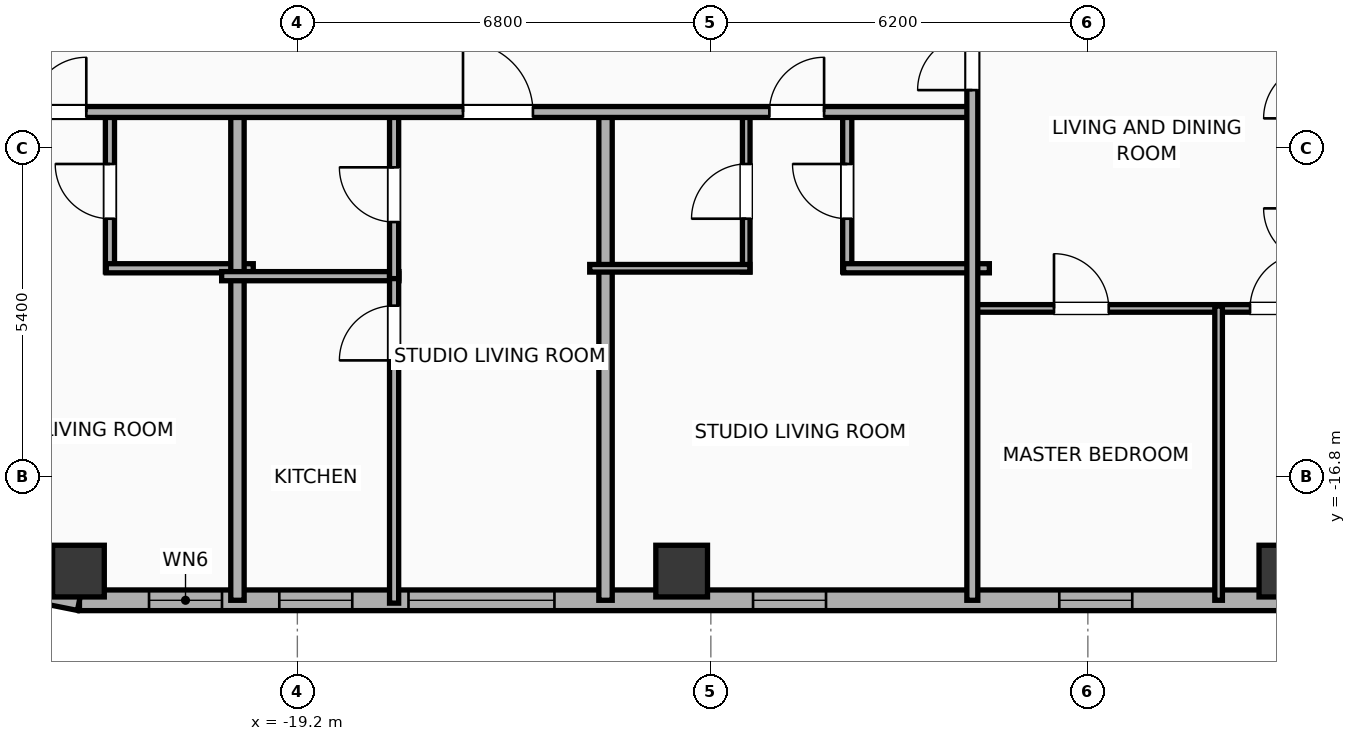
"""IFC4 building model, lengths in metres.
Left out: names, types, materials, properties, quantities, classifications, styles, units other than length and angle.
Written with IfcOpenShell. Run it as: python <this file> out.ifc"""

import sys

from ifc_helpers import new_model, si_unit, direction, frame, frame_2d, origin, origin_2d, place, context, subcontext, project, spatial, rectangle, hollow_rectangle, extrude, element, fill, save


model = new_model("IFC4")
c1 = context("Model", 3, precision=1e-05, world=origin(), true_north=direction((0.0, 1.0)))
c2 = subcontext(c1, "Body", "Model", "MODEL_VIEW")
j1 = project(units=[si_unit("LENGTHUNIT", "METRE"), si_unit("PLANEANGLEUNIT", "RADIAN")], contexts=[c1])
p1 = place(None, origin())
s1 = spatial("IfcSite", under=j1, at=p1, CompositionType="ELEMENT")
p2 = place(p1, origin())
s2 = spatial("IfcBuilding", under=s1, at=p2, CompositionType="ELEMENT")
p3 = place(p2, frame((0.0, 0.0, 215.8)))
s3 = spatial("IfcBuildingStorey", under=s2, at=p3, CompositionType="ELEMENT", Elevation=215.8)
for number, where, z_axis, x_axis in (
    (1, (-22.8, -18.35, 0.0), (0.0, 0.0, 1.0), (1.0, 0.0, 0.0)),
    (2, (-12.88, -18.35, 0.0), (0.0, 0.0, 1.0), (1.0, 0.0, 0.0)),
    (3, (-2.96, -18.35, 0.0), (0.0, 0.0, 1.0), (1.0, 0.0, 0.0)),
):
    element("IfcColumn", number, at=place(p3, frame(where, z_axis=z_axis, x_axis=x_axis)), inside=s3, PredefinedType="COLUMN", context=c2, shape_type="SweptSolid", body=[
        extrude(hollow_rectangle(XDim=0.85, YDim=0.85, WallThickness=0.028, at=origin_2d()), origin(), (0.0, 0.0, 1.0), 3.9),
    ])
p4 = place(p3, frame((26.783, -18.83, 0.0), z_axis=(0.0, 0.0, 1.0), x_axis=(-1.0, 0.0, 0.0)))
e4 = element("IfcWall", 4, at=p4, inside=s3, PredefinedType="ELEMENTEDWALL", context=c2, shape_type="SweptSolid", body=[
    extrude(rectangle(XDim=49.566, YDim=0.34, at=frame_2d((24.783, 0.0))), origin(), (0.0, 0.0, 1.0), 3.65),
])
p5 = place(p4, frame((23.583, 0.0, 0.75)))
e5 = element("IfcOpeningElement", 5, at=p5, cuts=e4, PredefinedType="OPENING", context=c2, shape_type="SweptSolid", body=[
    extrude(rectangle(XDim=2.4, YDim=2.1, at=frame_2d((1.2, 1.05))), frame((0.0, 0.18, 0.0), z_axis=(0.0, -1.0, 0.0), x_axis=(1.0, 0.0, 0.0)), (0.0, 0.0, 1.0), 0.36),
])
p6 = place(p4, frame((41.756, 0.0, 0.75)))
e6 = element("IfcOpeningElement", 6, at=p6, cuts=e4, PredefinedType="OPENING", context=c2, shape_type="SweptSolid", body=[
    extrude(rectangle(XDim=2.4, YDim=2.1, at=frame_2d((1.2, 1.05))), frame((0.0, 0.18, 0.0), z_axis=(0.0, -1.0, 0.0), x_axis=(1.0, 0.0, 0.0)), (0.0, 0.0, 1.0), 0.36),
])
p7 = place(p4, frame((47.222, 0.0, 0.75)))
e7 = element("IfcOpeningElement", 7, at=p7, cuts=e4, PredefinedType="OPENING", context=c2, shape_type="SweptSolid", body=[
    extrude(rectangle(XDim=1.2, YDim=2.05, at=frame_2d((0.6, 1.025))), frame((0.0, 0.18, 0.0), z_axis=(0.0, -1.0, 0.0), x_axis=(1.0, 0.0, 0.0)), (0.0, 0.0, 1.0), 0.36),
])
p8 = place(p4, frame((45.08, 0.0, 0.75)))
e8 = element("IfcOpeningElement", 8, at=p8, cuts=e4, PredefinedType="OPENING", context=c2, shape_type="SweptSolid", body=[
    extrude(rectangle(XDim=1.2, YDim=2.05, at=frame_2d((0.6, 1.025))), frame((0.0, 0.18, 0.0), z_axis=(0.0, -1.0, 0.0), x_axis=(1.0, 0.0, 0.0)), (0.0, 0.0, 1.0), 0.36),
])
p9 = place(p4, frame((37.289, 0.0, 0.75)))
e9 = element("IfcOpeningElement", 9, at=p9, cuts=e4, PredefinedType="OPENING", context=c2, shape_type="SweptSolid", body=[
    extrude(rectangle(XDim=1.2, YDim=2.05, at=frame_2d((0.6, 1.025))), frame((0.0, 0.18, 0.0), z_axis=(0.0, -1.0, 0.0), x_axis=(1.0, 0.0, 0.0)), (0.0, 0.0, 1.0), 0.36),
])
p10 = place(p4, frame((16.115, 0.0, 0.75)))
e10 = element("IfcOpeningElement", 10, at=p10, cuts=e4, PredefinedType="OPENING", context=c2, shape_type="SweptSolid", body=[
    extrude(rectangle(XDim=1.2, YDim=2.05, at=frame_2d((0.6, 1.025))), frame((0.0, 0.18, 0.0), z_axis=(0.0, -1.0, 0.0), x_axis=(1.0, 0.0, 0.0)), (0.0, 0.0, 1.0), 0.36),
])
p11 = place(p4, frame((12.422, 0.0, 0.75)))
e11 = element("IfcOpeningElement", 11, at=p11, cuts=e4, PredefinedType="OPENING", context=c2, shape_type="SweptSolid", body=[
    extrude(rectangle(XDim=1.2, YDim=2.05, at=frame_2d((0.6, 1.025))), frame((0.0, 0.18, 0.0), z_axis=(0.0, -1.0, 0.0), x_axis=(1.0, 0.0, 0.0)), (0.0, 0.0, 1.0), 0.36),
])
p12 = place(p4, frame((8.09, 0.0, 0.75)))
e12 = element("IfcOpeningElement", 12, at=p12, cuts=e4, PredefinedType="OPENING", context=c2, shape_type="SweptSolid", body=[
    extrude(rectangle(XDim=1.2, YDim=2.05, at=frame_2d((0.6, 1.025))), frame((0.0, 0.18, 0.0), z_axis=(0.0, -1.0, 0.0), x_axis=(1.0, 0.0, 0.0)), (0.0, 0.0, 1.0), 0.36),
])
p13 = place(p4, frame((4.637, 0.0, 0.75)))
e13 = element("IfcOpeningElement", 13, at=p13, cuts=e4, PredefinedType="OPENING", context=c2, shape_type="SweptSolid", body=[
    extrude(rectangle(XDim=1.2, YDim=2.05, at=frame_2d((0.6, 1.025))), frame((0.0, 0.18, 0.0), z_axis=(0.0, -1.0, 0.0), x_axis=(1.0, 0.0, 0.0)), (0.0, 0.0, 1.0), 0.36),
])
p14 = place(p4, frame((1.811, 0.0, 0.75)))
e14 = element("IfcOpeningElement", 14, at=p14, cuts=e4, PredefinedType="OPENING", context=c2, shape_type="SweptSolid", body=[
    extrude(rectangle(XDim=1.2, YDim=2.05, at=frame_2d((0.6, 1.025))), frame((0.0, 0.18, 0.0), z_axis=(0.0, -1.0, 0.0), x_axis=(1.0, 0.0, 0.0)), (0.0, 0.0, 1.0), 0.36),
])
p15 = place(p4, frame((32.253, 0.0, 0.75)))
e15 = element("IfcOpeningElement", 15, at=p15, cuts=e4, PredefinedType="OPENING", context=c2, shape_type="SweptSolid", body=[
    extrude(rectangle(XDim=1.2, YDim=2.05, at=frame_2d((0.6, 1.025))), frame((0.0, 0.18, 0.0), z_axis=(0.0, -1.0, 0.0), x_axis=(1.0, 0.0, 0.0)), (0.0, 0.0, 1.0), 0.36),
])
p16 = place(p4, frame((27.853, 0.0, 0.75)))
e16 = element("IfcOpeningElement", 16, at=p16, cuts=e4, PredefinedType="OPENING", context=c2, shape_type="SweptSolid", body=[
    extrude(rectangle(XDim=1.2, YDim=2.05, at=frame_2d((0.6, 1.025))), frame((0.0, 0.18, 0.0), z_axis=(0.0, -1.0, 0.0), x_axis=(1.0, 0.0, 0.0)), (0.0, 0.0, 1.0), 0.36),
])
p17 = place(p4, frame((20.473, 0.0, 0.75)))
e17 = element("IfcOpeningElement", 17, at=p17, cuts=e4, PredefinedType="OPENING", context=c2, shape_type="SweptSolid", body=[
    extrude(rectangle(XDim=1.2, YDim=2.05, at=frame_2d((0.6, 1.025))), frame((0.0, 0.18, 0.0), z_axis=(0.0, -1.0, 0.0), x_axis=(1.0, 0.0, 0.0)), (0.0, 0.0, 1.0), 0.36),
])
p18 = place(p3, frame((-22.783, -18.83, 0.0), z_axis=(0.0, 0.0, 1.0), x_axis=(-0.980788153188, 0.195075878998, 0.0)))
e18 = element("IfcWall", 18, at=p18, inside=s3, PredefinedType="ELEMENTEDWALL", context=c2, shape_type="SweptSolid", body=[
    extrude(rectangle(XDim=1.354, YDim=0.34, at=frame_2d((0.677, 0.0))), origin(), (0.0, 0.0, 1.0), 3.65),
])
p19 = place(p3, frame((-22.282, -13.43, 0.0), z_axis=(0.0, 0.0, 1.0), x_axis=(0.0, 1.0, 0.0)))
e19 = element("IfcWall", 19, at=p19, inside=s3, PredefinedType="PLUMBINGWALL", context=c2, shape_type="SweptSolid", body=[
    extrude(rectangle(XDim=2.65, YDim=0.15, at=frame_2d((1.325, 0.0))), origin(), (0.0, 0.0, 1.0), 3.65),
])
p20 = place(p19, frame((0.875, 0.0, 0.0)))
e20 = element("IfcOpeningElement", 20, at=p20, cuts=e19, PredefinedType="OPENING", context=c2, shape_type="SweptSolid", body=[
    extrude(rectangle(XDim=0.9, YDim=2.05, at=frame_2d((0.45, 1.025))), frame((0.0, 0.085, 0.0), z_axis=(0.0, -1.0, 0.0), x_axis=(1.0, 0.0, 0.0)), (0.0, 0.0, 1.0), 0.17),
])
p21 = place(p3, frame((-22.342, -13.37, 0.0), z_axis=(0.0, 0.0, 1.0), x_axis=(1.0, 0.0, 0.0)))
e21 = element("IfcWall", 21, at=p21, inside=s3, PredefinedType="PLUMBINGWALL", context=c2, shape_type="SweptSolid", body=[
    extrude(rectangle(XDim=2.417, YDim=0.15, at=frame_2d((1.208, 0.0))), origin(), (0.0, 0.0, 1.0), 3.65),
])
p22 = place(p3, frame((-20.185, -18.83, 0.0), z_axis=(0.0, 0.0, 1.0), x_axis=(0.0, 1.0, 0.0)))
e22 = element("IfcWall", 22, at=p22, inside=s3, PredefinedType="PARTITIONING", context=c2, shape_type="SweptSolid", body=[
    extrude(rectangle(XDim=8.11, YDim=0.22, at=frame_2d((4.055, 0.0))), origin(), (0.0, 0.0, 1.0), 3.09),
])
p23 = place(p3, frame((-20.445, -13.5, 0.0), z_axis=(0.0, 0.0, 1.0), x_axis=(1.0, 0.0, 0.0)))
e23 = element("IfcWall", 23, at=p23, inside=s3, PredefinedType="PLUMBINGWALL", context=c2, shape_type="SweptSolid", body=[
    extrude(rectangle(XDim=2.916, YDim=0.15, at=frame_2d((1.458, 0.0))), origin(), (0.0, 0.0, 1.0), 3.65),
])
p24 = place(p3, frame((-17.609, -18.877, 0.0), z_axis=(0.0, 0.0, 1.0), x_axis=(0.0, 1.0, 0.0)))
e24 = element("IfcWall", 24, at=p24, inside=s3, PredefinedType="PLUMBINGWALL", context=c2, shape_type="SweptSolid", body=[
    extrude(rectangle(XDim=5.417, YDim=0.15, at=frame_2d((2.708, 0.0))), origin(), (0.0, 0.0, 1.0), 3.65),
])
p25 = place(p24, frame((3.992, 0.0, 0.0)))
e25 = element("IfcOpeningElement", 25, at=p25, cuts=e24, PredefinedType="OPENING", context=c2, shape_type="SweptSolid", body=[
    extrude(rectangle(XDim=0.9, YDim=2.05, at=frame_2d((0.45, 1.025))), frame((0.0, 0.085, 0.0), z_axis=(0.0, -1.0, 0.0), x_axis=(1.0, 0.0, 0.0)), (0.0, 0.0, 1.0), 0.17),
])
p26 = place(p3, frame((-17.609, -13.54, 0.0), z_axis=(0.0, 0.0, 1.0), x_axis=(0.0, 1.0, 0.0)))
e26 = element("IfcWall", 26, at=p26, inside=s3, PredefinedType="PLUMBINGWALL", context=c2, shape_type="SweptSolid", body=[
    extrude(rectangle(XDim=2.76, YDim=0.15, at=frame_2d((1.38, 0.0))), origin(), (0.0, 0.0, 1.0), 3.65),
])
p27 = place(p26, frame((0.93, 0.0, 0.0)))
e27 = element("IfcOpeningElement", 27, at=p27, cuts=e26, PredefinedType="OPENING", context=c2, shape_type="SweptSolid", body=[
    extrude(rectangle(XDim=0.9, YDim=2.05, at=frame_2d((0.45, 1.025))), frame((0.0, 0.085, 0.0), z_axis=(0.0, -1.0, 0.0), x_axis=(1.0, 0.0, 0.0)), (0.0, 0.0, 1.0), 0.17),
])
p28 = place(p3, frame((-14.132, -18.83, 0.0), z_axis=(0.0, 0.0, 1.0), x_axis=(0.0, 1.0, 0.0)))
e28 = element("IfcWall", 28, at=p28, inside=s3, PredefinedType="PARTITIONING", context=c2, shape_type="SweptSolid", body=[
    extrude(rectangle(XDim=8.11, YDim=0.22, at=frame_2d((4.055, 0.0))), origin(), (0.0, 0.0, 1.0), 3.65),
])
p29 = place(p3, frame((-11.818, -13.43, 0.0), z_axis=(0.0, 0.0, 1.0), x_axis=(0.0, 1.0, 0.0)))
e29 = element("IfcWall", 29, at=p29, inside=s3, PredefinedType="PARTITIONING", context=c2, shape_type="SweptSolid", body=[
    extrude(rectangle(XDim=2.65, YDim=0.125, at=frame_2d((1.325, 0.0))), origin(), (0.0, 0.0, 1.0), 3.65),
])
p30 = place(p29, frame((0.875, 0.0, 0.0)))
e30 = element("IfcOpeningElement", 30, at=p30, cuts=e29, PredefinedType="OPENING", context=c2, shape_type="SweptSolid", body=[
    extrude(rectangle(XDim=0.9, YDim=2.05, at=frame_2d((0.45, 1.025))), frame((0.0, 0.073, 0.0), z_axis=(0.0, -1.0, 0.0), x_axis=(1.0, 0.0, 0.0)), (0.0, 0.0, 1.0), 0.145),
])
p31 = place(p3, frame((-10.157, -13.43, 0.0), z_axis=(0.0, 0.0, 1.0), x_axis=(0.0, 1.0, 0.0)))
e31 = element("IfcWall", 31, at=p31, inside=s3, PredefinedType="PLUMBINGWALL", context=c2, shape_type="SweptSolid", body=[
    extrude(rectangle(XDim=2.65, YDim=0.15, at=frame_2d((1.325, 0.0))), origin(), (0.0, 0.0, 1.0), 3.65),
])
p32 = place(p31, frame((0.875, 0.0, 0.0)))
e32 = element("IfcOpeningElement", 32, at=p32, cuts=e31, PredefinedType="OPENING", context=c2, shape_type="SweptSolid", body=[
    extrude(rectangle(XDim=0.9, YDim=2.05, at=frame_2d((0.45, 1.025))), frame((0.0, 0.085, 0.0), z_axis=(0.0, -1.0, 0.0), x_axis=(1.0, 0.0, 0.0)), (0.0, 0.0, 1.0), 0.17),
])
p33 = place(p3, frame((-14.392, -13.37, 0.0), z_axis=(0.0, 0.0, 1.0), x_axis=(1.0, 0.0, 0.0)))
e33 = element("IfcWall", 33, at=p33, inside=s3, PredefinedType="PARTITIONING", context=c2, shape_type="SweptSolid", body=[
    extrude(rectangle(XDim=2.634, YDim=0.125, at=frame_2d((1.317, 0.0))), origin(), (0.0, 0.0, 1.0), 3.65),
])
p34 = place(p3, frame((-10.217, -13.37, 0.0), z_axis=(0.0, 0.0, 1.0), x_axis=(1.0, 0.0, 0.0)))
e34 = element("IfcWall", 34, at=p34, inside=s3, PredefinedType="PLUMBINGWALL", context=c2, shape_type="SweptSolid", body=[
    extrude(rectangle(XDim=2.397, YDim=0.15, at=frame_2d((1.198, 0.0))), origin(), (0.0, 0.0, 1.0), 3.65),
])
p35 = place(p3, frame((-26.23, -10.8, 0.0), z_axis=(0.0, 0.0, 1.0), x_axis=(1.0, 0.0, 0.0)))
e35 = element("IfcWall", 35, at=p35, inside=s3, PredefinedType="PARTITIONING", context=c2, shape_type="SweptSolid", body=[
    extrude(rectangle(XDim=18.15, YDim=0.18, at=frame_2d((9.075, 0.0))), origin(), (0.0, 0.0, 1.0), 3.65),
])
p36 = place(p35, frame((2.659, 0.0, 0.0)))
e36 = element("IfcOpeningElement", 36, at=p36, cuts=e35, PredefinedType="OPENING", context=c2, shape_type="SweptSolid", body=[
    extrude(rectangle(XDim=0.9, YDim=2.05, at=frame_2d((0.45, 1.025))), frame((0.0, 0.1, 0.0), z_axis=(0.0, -1.0, 0.0), x_axis=(1.0, 0.0, 0.0)), (0.0, 0.0, 1.0), 0.2),
])
p37 = place(p35, frame((9.754, 0.0, 0.0)))
e37 = element("IfcOpeningElement", 37, at=p37, cuts=e35, PredefinedType="OPENING", context=c2, shape_type="SweptSolid", body=[
    extrude(rectangle(XDim=1.15, YDim=2.05, at=frame_2d((0.575, 1.025))), frame((0.0, 0.1, 0.0), z_axis=(0.0, -1.0, 0.0), x_axis=(1.0, 0.0, 0.0)), (0.0, 0.0, 1.0), 0.2),
])
p38 = place(p35, frame((14.792, 0.0, 0.0)))
e38 = element("IfcOpeningElement", 38, at=p38, cuts=e35, PredefinedType="OPENING", context=c2, shape_type="SweptSolid", body=[
    extrude(rectangle(XDim=0.9, YDim=2.05, at=frame_2d((0.45, 1.025))), frame((0.0, 0.1, 0.0), z_axis=(0.0, -1.0, 0.0), x_axis=(1.0, 0.0, 0.0)), (0.0, 0.0, 1.0), 0.2),
])
p39 = place(p3, frame((-8.08, -14.03, 0.0), z_axis=(0.0, 0.0, 1.0), x_axis=(1.0, 0.0, 0.0)))
e39 = element("IfcWall", 39, at=p39, inside=s3, PredefinedType="PARTITIONING", context=c2, shape_type="SweptSolid", body=[
    extrude(rectangle(XDim=8.06, YDim=0.125, at=frame_2d((4.03, 0.0))), origin(), (0.0, 0.0, 1.0), 3.65),
])
p40 = place(p39, frame((1.323, 0.0, 0.0)))
e40 = element("IfcOpeningElement", 40, at=p40, cuts=e39, PredefinedType="OPENING", context=c2, shape_type="SweptSolid", body=[
    extrude(rectangle(XDim=0.9, YDim=2.05, at=frame_2d((0.45, 1.025))), frame((0.0, 0.073, 0.0), z_axis=(0.0, -1.0, 0.0), x_axis=(1.0, 0.0, 0.0)), (0.0, 0.0, 1.0), 0.145),
])
p41 = place(p39, frame((4.547, 0.0, 0.0)))
e41 = element("IfcOpeningElement", 41, at=p41, cuts=e39, PredefinedType="OPENING", context=c2, shape_type="SweptSolid", body=[
    extrude(rectangle(XDim=0.9, YDim=2.05, at=frame_2d((0.45, 1.025))), frame((0.0, 0.073, 0.0), z_axis=(0.0, -1.0, 0.0), x_axis=(1.0, 0.0, 0.0)), (0.0, 0.0, 1.0), 0.145),
])
p42 = place(p3, frame((-4.05, -18.83, 0.0), z_axis=(0.0, 0.0, 1.0), x_axis=(0.0, 1.0, 0.0)))
e42 = element("IfcWall", 42, at=p42, inside=s3, PredefinedType="PARTITIONING", context=c2, shape_type="SweptSolid", body=[
    extrude(rectangle(XDim=4.84, YDim=0.125, at=frame_2d((2.42, 0.0))), origin(), (0.0, 0.0, 1.0), 3.65),
])
p43 = place(p3, frame((-8.1, -18.83, 0.0), z_axis=(0.0, 0.0, 1.0), x_axis=(0.0, 1.0, 0.0)))
e43 = element("IfcWall", 43, at=p43, inside=s3, PredefinedType="PARTITIONING", context=c2, shape_type="SweptSolid", body=[
    extrude(rectangle(XDim=9.64, YDim=0.18, at=frame_2d((4.82, 0.0))), origin(), (0.0, 0.0, 1.0), 3.65),
])
p44 = place(p43, frame((8.39, 0.0, 0.0)))
e44 = element("IfcOpeningElement", 44, at=p44, cuts=e43, PredefinedType="OPENING", context=c2, shape_type="SweptSolid", body=[
    extrude(rectangle(XDim=0.9, YDim=2.05, at=frame_2d((0.45, 1.025))), frame((0.0, 0.1, 0.0), z_axis=(0.0, -1.0, 0.0), x_axis=(1.0, 0.0, 0.0)), (0.0, 0.0, 1.0), 0.2),
])
p45 = place(p6, origin())
e45 = element("IfcWindow", 45, at=p45, inside=s3, PartitioningType="SINGLE_PANEL", PredefinedType="WINDOW", context=c2, shape_type="SweptSolid", body=[
    extrude(rectangle(XDim=2.4, YDim=2.1, at=frame_2d((1.2, 1.05))), frame((0.0, 0.03, 0.0), z_axis=(0.0, -1.0, 0.0), x_axis=(1.0, 0.0, 0.0)), (0.0, 0.0, 1.0), 0.06),
])
fill(e6, e45)
p46 = place(p7, origin())
e46 = element("IfcWindow", 46, at=p46, inside=s3, PartitioningType="SINGLE_PANEL", PredefinedType="WINDOW", context=c2, shape_type="SweptSolid", body=[
    extrude(rectangle(XDim=1.2, YDim=2.05, at=frame_2d((0.6, 1.025))), frame((0.0, 0.03, 0.0), z_axis=(0.0, -1.0, 0.0), x_axis=(1.0, 0.0, 0.0)), (0.0, 0.0, 1.0), 0.06),
])
fill(e7, e46)
p47 = place(p8, origin())
e47 = element("IfcWindow", 47, at=p47, inside=s3, PartitioningType="SINGLE_PANEL", PredefinedType="WINDOW", context=c2, shape_type="SweptSolid", body=[
    extrude(rectangle(XDim=1.2, YDim=2.05, at=frame_2d((0.6, 1.025))), frame((0.0, 0.03, 0.0), z_axis=(0.0, -1.0, 0.0), x_axis=(1.0, 0.0, 0.0)), (0.0, 0.0, 1.0), 0.06),
])
fill(e8, e47)
p48 = place(p9, origin())
e48 = element("IfcWindow", 48, at=p48, inside=s3, PartitioningType="SINGLE_PANEL", PredefinedType="WINDOW", context=c2, shape_type="SweptSolid", body=[
    extrude(rectangle(XDim=1.2, YDim=2.05, at=frame_2d((0.6, 1.025))), frame((0.0, 0.03, 0.0), z_axis=(0.0, -1.0, 0.0), x_axis=(1.0, 0.0, 0.0)), (0.0, 0.0, 1.0), 0.06),
])
fill(e9, e48)
p49 = place(p15, origin())
e49 = element("IfcWindow", 49, at=p49, inside=s3, PartitioningType="SINGLE_PANEL", PredefinedType="WINDOW", context=c2, shape_type="SweptSolid", body=[
    extrude(rectangle(XDim=1.2, YDim=2.05, at=frame_2d((0.6, 1.025))), frame((0.0, 0.03, 0.0), z_axis=(0.0, -1.0, 0.0), x_axis=(1.0, 0.0, 0.0)), (0.0, 0.0, 1.0), 0.06),
])
fill(e15, e49)
p50 = place(p20, origin())
e50 = element("IfcDoor", 50, at=p50, inside=s3, OperationType="SINGLE_SWING_RIGHT", PredefinedType="DOOR", context=c2, shape_type="SweptSolid", body=[
    extrude(rectangle(XDim=0.9, YDim=2.05, at=frame_2d((0.45, 1.025))), frame((0.0, 0.025, 0.0), z_axis=(0.0, -1.0, 0.0), x_axis=(1.0, 0.0, 0.0)), (0.0, 0.0, 1.0), 0.05),
])
fill(e20, e50)
p51 = place(p25, origin())
e51 = element("IfcDoor", 51, at=p51, inside=s3, OperationType="SINGLE_SWING_LEFT", PredefinedType="DOOR", context=c2, shape_type="SweptSolid", body=[
    extrude(rectangle(XDim=0.9, YDim=2.05, at=frame_2d((0.45, 1.025))), frame((0.0, 0.025, 0.0), z_axis=(0.0, -1.0, 0.0), x_axis=(1.0, 0.0, 0.0)), (0.0, 0.0, 1.0), 0.05),
])
fill(e25, e51)
p52 = place(p27, origin())
e52 = element("IfcDoor", 52, at=p52, inside=s3, OperationType="SINGLE_SWING_RIGHT", PredefinedType="DOOR", context=c2, shape_type="SweptSolid", body=[
    extrude(rectangle(XDim=0.9, YDim=2.05, at=frame_2d((0.45, 1.025))), frame((0.0, 0.025, 0.0), z_axis=(0.0, -1.0, 0.0), x_axis=(1.0, 0.0, 0.0)), (0.0, 0.0, 1.0), 0.05),
])
fill(e27, e52)
p53 = place(p30, origin())
e53 = element("IfcDoor", 53, at=p53, inside=s3, OperationType="SINGLE_SWING_LEFT", PredefinedType="DOOR", context=c2, shape_type="SweptSolid", body=[
    extrude(rectangle(XDim=0.9, YDim=2.05, at=frame_2d((0.45, 1.025))), frame((0.0, 0.025, 0.0), z_axis=(0.0, -1.0, 0.0), x_axis=(1.0, 0.0, 0.0)), (0.0, 0.0, 1.0), 0.05),
])
fill(e30, e53)
p54 = place(p32, origin())
e54 = element("IfcDoor", 54, at=p54, inside=s3, OperationType="SINGLE_SWING_RIGHT", PredefinedType="DOOR", context=c2, shape_type="SweptSolid", body=[
    extrude(rectangle(XDim=0.9, YDim=2.05, at=frame_2d((0.45, 1.025))), frame((0.0, 0.025, 0.0), z_axis=(0.0, -1.0, 0.0), x_axis=(1.0, 0.0, 0.0)), (0.0, 0.0, 1.0), 0.05),
])
fill(e32, e54)
p55 = place(p36, origin())
e55 = element("IfcDoor", 55, at=p55, inside=s3, OperationType="SINGLE_SWING_RIGHT", PredefinedType="DOOR", context=c2, shape_type="SweptSolid", body=[
    extrude(rectangle(XDim=0.9, YDim=2.05, at=frame_2d((0.45, 1.025))), frame((0.0, 0.025, 0.0), z_axis=(0.0, -1.0, 0.0), x_axis=(1.0, 0.0, 0.0)), (0.0, 0.0, 1.0), 0.05),
])
fill(e36, e55)
p56 = place(p37, origin())
e56 = element("IfcDoor", 56, at=p56, inside=s3, OperationType="SINGLE_SWING_LEFT", PredefinedType="DOOR", context=c2, shape_type="SweptSolid", body=[
    extrude(rectangle(XDim=1.15, YDim=2.05, at=frame_2d((0.575, 1.025))), frame((0.0, 0.025, 0.0), z_axis=(0.0, -1.0, 0.0), x_axis=(1.0, 0.0, 0.0)), (0.0, 0.0, 1.0), 0.05),
])
fill(e37, e56)
p57 = place(p38, origin())
e57 = element("IfcDoor", 57, at=p57, inside=s3, OperationType="SINGLE_SWING_RIGHT", PredefinedType="DOOR", context=c2, shape_type="SweptSolid", body=[
    extrude(rectangle(XDim=0.9, YDim=2.05, at=frame_2d((0.45, 1.025))), frame((0.0, 0.025, 0.0), z_axis=(0.0, -1.0, 0.0), x_axis=(1.0, 0.0, 0.0)), (0.0, 0.0, 1.0), 0.05),
])
fill(e38, e57)
p58 = place(p40, origin())
e58 = element("IfcDoor", 58, at=p58, inside=s3, OperationType="SINGLE_SWING_LEFT", PredefinedType="DOOR", context=c2, shape_type="SweptSolid", body=[
    extrude(rectangle(XDim=0.9, YDim=2.05, at=frame_2d((0.45, 1.025))), frame((0.0, 0.025, 0.0), z_axis=(0.0, -1.0, 0.0), x_axis=(1.0, 0.0, 0.0)), (0.0, 0.0, 1.0), 0.05),
])
fill(e40, e58)
p59 = place(p41, origin())
e59 = element("IfcDoor", 59, at=p59, inside=s3, OperationType="SINGLE_SWING_RIGHT", PredefinedType="DOOR", context=c2, shape_type="SweptSolid", body=[
    extrude(rectangle(XDim=0.9, YDim=2.05, at=frame_2d((0.45, 1.025))), frame((0.0, 0.025, 0.0), z_axis=(0.0, -1.0, 0.0), x_axis=(1.0, 0.0, 0.0)), (0.0, 0.0, 1.0), 0.05),
])
fill(e41, e59)
p60 = place(p44, origin())
e60 = element("IfcDoor", 60, at=p60, inside=s3, OperationType="SINGLE_SWING_LEFT", PredefinedType="DOOR", context=c2, shape_type="SweptSolid", body=[
    extrude(rectangle(XDim=0.9, YDim=2.05, at=frame_2d((0.45, 1.025))), frame((0.0, 0.025, 0.0), z_axis=(0.0, -1.0, 0.0), x_axis=(1.0, 0.0, 0.0)), (0.0, 0.0, 1.0), 0.05),
])
fill(e44, e60)
save(model, sys.argv[1])
